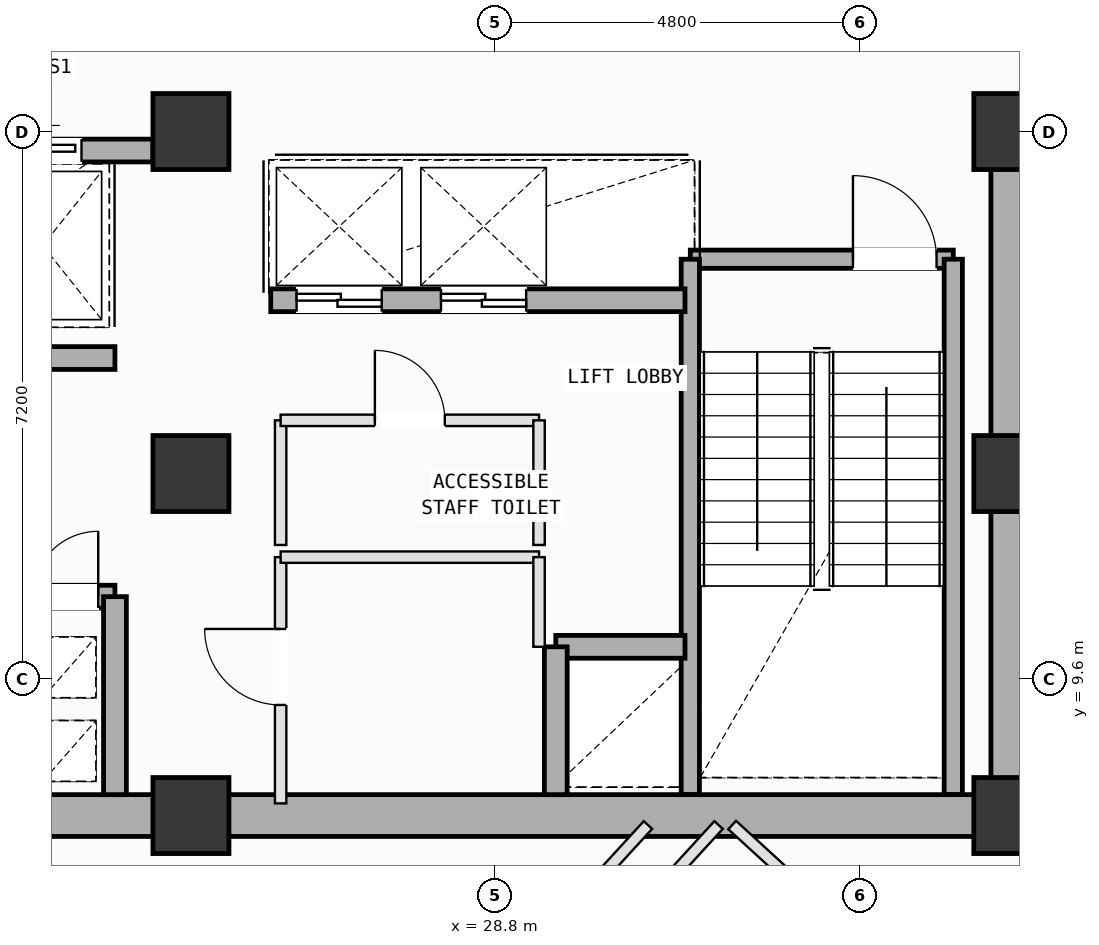
"""IFC4 building model, lengths in metres.
Left out: names, types, materials, properties, quantities, classifications, styles, units other than length and angle.
Written with IfcOpenShell. Run it as: python <this file> out.ifc"""

import sys

from ifc_helpers import new_model, si_unit, direction, frame, frame_2d, origin, origin_2d, place, context, subcontext, project, spatial, rectangle, extrude, element, fill, save


model = new_model("IFC4")
c1 = context("Model", 3, precision=1e-05, world=origin(), true_north=direction((0.0, 1.0)))
c2 = subcontext(c1, "Body", "Model", "MODEL_VIEW")
j1 = project(units=[si_unit("LENGTHUNIT", "METRE"), si_unit("PLANEANGLEUNIT", "RADIAN")], contexts=[c1])
p1 = place(None, origin())
s1 = spatial("IfcSite", under=j1, at=p1, CompositionType="ELEMENT")
p2 = place(p1, origin())
s2 = spatial("IfcBuilding", under=s1, at=p2, CompositionType="ELEMENT")
p3 = place(p2, frame((0.0, 0.0, 227.2)))
s3 = spatial("IfcBuildingStorey", under=s2, at=p3, CompositionType="ELEMENT", Elevation=227.2)
for number, where, z_axis, x_axis in (
    (1, (24.8, 7.8, 0.0), (0.0, 0.0, 1.0), (1.0, 0.0, 0.0)),
    (2, (24.8, 12.3, 0.0), (0.0, 0.0, 1.0), (1.0, 0.0, 0.0)),
    (3, (24.8, 16.8, 0.0), (0.0, 0.0, 1.0), (1.0, 0.0, 0.0)),
    (4, (35.6, 7.8, 0.0), (0.0, 0.0, 1.0), (1.0, 0.0, 0.0)),
    (5, (35.6, 12.3, 0.0), (0.0, 0.0, 1.0), (1.0, 0.0, 0.0)),
    (6, (35.6, 16.8, 0.0), (0.0, 0.0, 1.0), (1.0, 0.0, 0.0)),
):
    element("IfcColumn", number, at=place(p3, frame(where, z_axis=z_axis, x_axis=x_axis)), inside=s3, PredefinedType="COLUMN", context=c2, shape_type="SweptSolid", body=[
        extrude(rectangle(XDim=1.0, YDim=1.0, at=origin_2d()), origin(), (0.0, 0.0, 1.0), 4.0),
    ])
p4 = place(p3, frame((31.37, 15.12, 0.0), z_axis=(0.0, 0.0, 1.0), x_axis=(1.0, 0.0, 0.0)))
e7 = element("IfcWall", 7, at=p4, inside=s3, PredefinedType="SOLIDWALL", context=c2, shape_type="SweptSolid", body=[
    extrude(rectangle(XDim=3.46, YDim=0.24, at=frame_2d((1.73, 0.0))), origin(), (0.0, 0.0, 1.0), 3.78),
])
p5 = place(p4, frame((2.14, 0.0, 0.0)))
e8 = element("IfcOpeningElement", 8, at=p5, cuts=e7, PredefinedType="OPENING", context=c2, shape_type="SweptSolid", body=[
    extrude(rectangle(XDim=1.1, YDim=2.15, at=frame_2d((0.55, 1.075))), frame((0.0, 0.13, 0.0), z_axis=(0.0, -1.0, 0.0), x_axis=(1.0, 0.0, 0.0)), (0.0, 0.0, 1.0), 0.26),
])
for number, where, z_axis, x_axis in (
    (9, (34.83, 15.12, 0.0), (0.0, 0.0, 1.0), (0.0, -1.0, 0.0)),
    (10, (31.37, 8.075, 0.0), (0.0, 0.0, 1.0), (0.0, 1.0, 0.0)),
):
    element("IfcWall", number, at=place(p3, frame(where, z_axis=z_axis, x_axis=x_axis)), inside=s3, PredefinedType="SOLIDWALL", context=c2, shape_type="SweptSolid", body=[
        extrude(rectangle(XDim=7.045, YDim=0.24, at=frame_2d((3.522, 0.0))), origin(), (0.0, 0.0, 1.0), 3.78),
    ])
for number, where, z_axis, x_axis in (
    (11, (14.0, 7.8, 0.0), (0.0, 0.0, 1.0), (1.0, 0.0, 0.0)),
    (12, (24.8, 7.8, 0.0), (0.0, 0.0, 1.0), (1.0, 0.0, 0.0)),
):
    element("IfcWall", number, at=place(p3, frame(where, z_axis=z_axis, x_axis=x_axis)), inside=s3, PredefinedType="SHEAR", context=c2, shape_type="SweptSolid", body=[
        extrude(rectangle(XDim=10.8, YDim=0.55, at=frame_2d((5.4, 0.0))), origin(), (0.0, 0.0, 1.0), 3.78),
    ])
p6 = place(p3, frame((35.6, 7.8, 0.0), z_axis=(0.0, 0.0, 1.0), x_axis=(0.0, 1.0, 0.0)))
e13 = element("IfcWall", 13, at=p6, inside=s3, PredefinedType="SHEAR", context=c2, shape_type="SweptSolid", body=[
    extrude(rectangle(XDim=9.0, YDim=0.55, at=frame_2d((4.5, 0.0))), origin(), (0.0, 0.0, 1.0), 3.78),
])
p7 = place(p3, frame((19.85, 16.55, 0.0), z_axis=(0.0, 0.0, 1.0), x_axis=(1.0, 0.0, 0.0)))
e14 = element("IfcWall", 14, at=p7, inside=s3, PredefinedType="SOLIDWALL", context=c2, shape_type="SweptSolid", body=[
    extrude(rectangle(XDim=4.45, YDim=0.3, at=frame_2d((2.225, 0.0))), origin(), (0.0, 0.0, 1.0), 3.78),
])
p8 = place(p7, frame((0.475, 0.0, 0.0)))
e15 = element("IfcOpeningElement", 15, at=p8, cuts=e14, PredefinedType="OPENING", context=c2, shape_type="SweptSolid", body=[
    extrude(rectangle(XDim=1.25, YDim=2.18, at=frame_2d((0.625, 1.09))), frame((0.0, 0.16, 0.0), z_axis=(0.0, -1.0, 0.0), x_axis=(1.0, 0.0, 0.0)), (0.0, 0.0, 1.0), 0.32),
])
p9 = place(p7, frame((2.49, 0.0, 0.0)))
e16 = element("IfcOpeningElement", 16, at=p9, cuts=e14, PredefinedType="OPENING", context=c2, shape_type="SweptSolid", body=[
    extrude(rectangle(XDim=1.02, YDim=2.12, at=frame_2d((0.51, 1.06))), frame((0.0, 0.16, 0.0), z_axis=(0.0, -1.0, 0.0), x_axis=(1.0, 0.0, 0.0)), (0.0, 0.0, 1.0), 0.32),
])
p10 = place(p3, frame((18.5, 10.68, 0.0), z_axis=(0.0, 0.0, 1.0), x_axis=(1.0, 0.0, 0.0)))
e17 = element("IfcWall", 17, at=p10, inside=s3, PredefinedType="SOLIDWALL", context=c2, shape_type="SweptSolid", body=[
    extrude(rectangle(XDim=5.3, YDim=0.3, at=frame_2d((2.65, 0.0))), origin(), (0.0, 0.0, 1.0), 3.78),
])
p11 = place(p10, frame((4.22, 0.0, 0.0)))
e18 = element("IfcOpeningElement", 18, at=p11, cuts=e17, PredefinedType="OPENING", context=c2, shape_type="SweptSolid", body=[
    extrude(rectangle(XDim=0.86, YDim=2.06, at=frame_2d((0.43, 1.03))), frame((0.0, 0.16, 0.0), z_axis=(0.0, -1.0, 0.0), x_axis=(1.0, 0.0, 0.0)), (0.0, 0.0, 1.0), 0.32),
])
p12 = place(p10, frame((0.425, 0.0, 0.0)))
e19 = element("IfcOpeningElement", 19, at=p12, cuts=e17, PredefinedType="OPENING", context=c2, shape_type="SweptSolid", body=[
    extrude(rectangle(XDim=1.25, YDim=2.18, at=frame_2d((0.625, 1.09))), frame((0.0, 0.16, 0.0), z_axis=(0.0, -1.0, 0.0), x_axis=(1.0, 0.0, 0.0)), (0.0, 0.0, 1.0), 0.32),
])
p13 = place(p10, frame((2.525, 0.0, 0.0)))
e20 = element("IfcOpeningElement", 20, at=p13, cuts=e17, PredefinedType="OPENING", context=c2, shape_type="SweptSolid", body=[
    extrude(rectangle(XDim=1.25, YDim=2.18, at=frame_2d((0.625, 1.09))), frame((0.0, 0.16, 0.0), z_axis=(0.0, -1.0, 0.0), x_axis=(1.0, 0.0, 0.0)), (0.0, 0.0, 1.0), 0.32),
])
p14 = place(p3, frame((18.5, 13.82, 0.0), z_axis=(0.0, 0.0, 1.0), x_axis=(1.0, 0.0, 0.0)))
e21 = element("IfcWall", 21, at=p14, inside=s3, PredefinedType="SOLIDWALL", context=c2, shape_type="SweptSolid", body=[
    extrude(rectangle(XDim=5.3, YDim=0.3, at=frame_2d((2.65, 0.0))), origin(), (0.0, 0.0, 1.0), 3.78),
])
p15 = place(p14, frame((0.18, 0.0, 0.0)))
e22 = element("IfcOpeningElement", 22, at=p15, cuts=e21, PredefinedType="OPENING", context=c2, shape_type="SweptSolid", body=[
    extrude(rectangle(XDim=1.1, YDim=2.15, at=frame_2d((0.55, 1.075))), frame((0.0, 0.16, 0.0), z_axis=(0.0, -1.0, 0.0), x_axis=(1.0, 0.0, 0.0)), (0.0, 0.0, 1.0), 0.32),
])
p16 = place(p3, frame((23.8, 8.075, 0.0), z_axis=(0.0, 0.0, 1.0), x_axis=(0.0, 1.0, 0.0)))
e23 = element("IfcWall", 23, at=p16, inside=s3, PredefinedType="SOLIDWALL", context=c2, shape_type="SweptSolid", body=[
    extrude(rectangle(XDim=2.605, YDim=0.3, at=frame_2d((1.302, 0.0))), origin(), (0.0, 0.0, 1.0), 3.78),
])
p17 = place(p3, frame((29.6, 10.02, 0.0), z_axis=(0.0, 0.0, 1.0), x_axis=(1.0, 0.0, 0.0)))
e24 = element("IfcWall", 24, at=p17, inside=s3, PredefinedType="SOLIDWALL", context=c2, shape_type="SweptSolid", body=[
    extrude(rectangle(XDim=1.7, YDim=0.3, at=frame_2d((0.85, 0.0))), origin(), (0.0, 0.0, 1.0), 3.78),
])
p18 = place(p3, frame((29.6, 8.075, 0.0), z_axis=(0.0, 0.0, 1.0), x_axis=(0.0, 1.0, 0.0)))
e25 = element("IfcWall", 25, at=p18, inside=s3, PredefinedType="SOLIDWALL", context=c2, shape_type="SweptSolid", body=[
    extrude(rectangle(XDim=1.945, YDim=0.3, at=frame_2d((0.973, 0.0))), origin(), (0.0, 0.0, 1.0), 3.78),
])
p19 = place(p3, frame((25.85, 14.58, 0.0), z_axis=(0.0, 0.0, 1.0), x_axis=(1.0, 0.0, 0.0)))
e26 = element("IfcWall", 26, at=p19, inside=s3, PredefinedType="SOLIDWALL", context=c2, shape_type="SweptSolid", body=[
    extrude(rectangle(XDim=5.45, YDim=0.3, at=frame_2d((2.725, 0.0))), origin(), (0.0, 0.0, 1.0), 3.78),
])
p20 = place(p19, frame((0.34, 0.0, 0.0)))
e27 = element("IfcOpeningElement", 27, at=p20, cuts=e26, PredefinedType="OPENING", context=c2, shape_type="SweptSolid", body=[
    extrude(rectangle(XDim=1.12, YDim=2.15, at=frame_2d((0.56, 1.075))), frame((0.0, 0.16, 0.0), z_axis=(0.0, -1.0, 0.0), x_axis=(1.0, 0.0, 0.0)), (0.0, 0.0, 1.0), 0.32),
])
p21 = place(p19, frame((2.24, 0.0, 0.0)))
e28 = element("IfcOpeningElement", 28, at=p21, cuts=e26, PredefinedType="OPENING", context=c2, shape_type="SweptSolid", body=[
    extrude(rectangle(XDim=1.12, YDim=2.15, at=frame_2d((0.56, 1.075))), frame((0.0, 0.16, 0.0), z_axis=(0.0, -1.0, 0.0), x_axis=(1.0, 0.0, 0.0)), (0.0, 0.0, 1.0), 0.32),
])
p22 = place(p3, frame((25.98, 7.96, 0.0), z_axis=(0.0, 0.0, 1.0), x_axis=(0.0, 1.0, 0.0)))
e29 = element("IfcWall", 29, at=p22, inside=s3, PredefinedType="PARTITIONING", context=c2, shape_type="SweptSolid", body=[
    extrude(rectangle(XDim=3.24, YDim=0.15, at=frame_2d((1.62, 0.0))), origin(), (0.0, 0.0, 1.0), 3.78),
])
p23 = place(p22, frame((1.295, 0.0, 0.0)))
e30 = element("IfcOpeningElement", 30, at=p23, cuts=e29, PredefinedType="OPENING", context=c2, shape_type="SweptSolid", body=[
    extrude(rectangle(XDim=1.0, YDim=2.12, at=frame_2d((0.5, 1.06))), frame((0.0, 0.085, 0.0), z_axis=(0.0, -1.0, 0.0), x_axis=(1.0, 0.0, 0.0)), (0.0, 0.0, 1.0), 0.17),
])
p24 = place(p3, frame((25.98, 11.2, 0.0), z_axis=(0.0, 0.0, 1.0), x_axis=(1.0, 0.0, 0.0)))
e31 = element("IfcWall", 31, at=p24, inside=s3, PredefinedType="PARTITIONING", context=c2, shape_type="SweptSolid", body=[
    extrude(rectangle(XDim=3.4, YDim=0.15, at=frame_2d((1.7, 0.0))), origin(), (0.0, 0.0, 1.0), 3.78),
])
p25 = place(p3, frame((29.38, 11.2, 0.0), z_axis=(0.0, 0.0, 1.0), x_axis=(0.0, -1.0, 0.0)))
e32 = element("IfcWall", 32, at=p25, inside=s3, PredefinedType="PARTITIONING", context=c2, shape_type="SweptSolid", body=[
    extrude(rectangle(XDim=1.18, YDim=0.15, at=frame_2d((0.59, 0.0))), origin(), (0.0, 0.0, 1.0), 3.78),
])
p26 = place(p3, frame((25.98, 11.36, 0.0), z_axis=(0.0, 0.0, 1.0), x_axis=(0.0, 1.0, 0.0)))
e33 = element("IfcWall", 33, at=p26, inside=s3, PredefinedType="PARTITIONING", context=c2, shape_type="SweptSolid", body=[
    extrude(rectangle(XDim=1.64, YDim=0.15, at=frame_2d((0.82, 0.0))), origin(), (0.0, 0.0, 1.0), 3.78),
])
p27 = place(p3, frame((25.98, 13.0, 0.0), z_axis=(0.0, 0.0, 1.0), x_axis=(1.0, 0.0, 0.0)))
e34 = element("IfcWall", 34, at=p27, inside=s3, PredefinedType="PARTITIONING", context=c2, shape_type="SweptSolid", body=[
    extrude(rectangle(XDim=3.4, YDim=0.15, at=frame_2d((1.7, 0.0))), origin(), (0.0, 0.0, 1.0), 3.78),
])
p28 = place(p27, frame((1.24, 0.0, 0.0)))
e35 = element("IfcOpeningElement", 35, at=p28, cuts=e34, PredefinedType="OPENING", context=c2, shape_type="SweptSolid", body=[
    extrude(rectangle(XDim=0.92, YDim=2.1, at=frame_2d((0.46, 1.05))), frame((0.0, 0.085, 0.0), z_axis=(0.0, -1.0, 0.0), x_axis=(1.0, 0.0, 0.0)), (0.0, 0.0, 1.0), 0.17),
])
p29 = place(p3, frame((29.38, 13.0, 0.0), z_axis=(0.0, 0.0, 1.0), x_axis=(0.0, -1.0, 0.0)))
e36 = element("IfcWall", 36, at=p29, inside=s3, PredefinedType="PARTITIONING", context=c2, shape_type="SweptSolid", body=[
    extrude(rectangle(XDim=1.64, YDim=0.15, at=frame_2d((0.82, 0.0))), origin(), (0.0, 0.0, 1.0), 3.78),
])
p30 = place(p3, frame((28.149, 3.753, 0.0), z_axis=(0.0, 0.0, 1.0), x_axis=(0.675493888576, 0.737365585376, 0.0)))
e37 = element("IfcWall", 37, at=p30, inside=s3, PredefinedType="PARTITIONING", context=c2, shape_type="SweptSolid", body=[
    extrude(rectangle(XDim=5.319, YDim=0.15, at=frame_2d((2.66, 0.0))), origin(), (0.0, 0.0, 1.0), 3.78),
])
p31 = place(p3, frame((31.921, 7.675, 0.0), z_axis=(0.0, 0.0, 1.0), x_axis=(0.737312092313, -0.675552276681, 0.0)))
e38 = element("IfcWall", 38, at=p31, inside=s3, PredefinedType="PARTITIONING", context=c2, shape_type="SweptSolid", body=[
    extrude(rectangle(XDim=11.804, YDim=0.15, at=frame_2d((5.902, 0.0))), origin(), (0.0, 0.0, 1.0), 3.78),
])
p32 = place(p31, frame((5.706, 0.0, 0.0)))
e39 = element("IfcOpeningElement", 39, at=p32, cuts=e38, PredefinedType="OPENING", context=c2, shape_type="SweptSolid", body=[
    extrude(rectangle(XDim=0.86, YDim=2.06, at=frame_2d((0.43, 1.03))), frame((0.0, 0.085, 0.0), z_axis=(0.0, -1.0, 0.0), x_axis=(1.0, 0.0, 0.0)), (0.0, 0.0, 1.0), 0.17),
])
p33 = place(p3, frame((35.6, 7.5, 0.0), z_axis=(0.0, 0.0, 1.0), x_axis=(1.0, 0.0, 0.0)))
e40 = element("IfcWall", 40, at=p33, inside=s3, PredefinedType="PARTITIONING", context=c2, shape_type="SweptSolid", body=[
    extrude(rectangle(XDim=0.55, YDim=0.15, at=frame_2d((0.275, 0.0))), origin(), (0.0, 0.0, 1.0), 3.78),
])
p34 = place(p3, frame((30.813, 7.675, 0.0), z_axis=(0.0, 0.0, 1.0), x_axis=(-0.675559122353, -0.73730582, 0.0)))
e41 = element("IfcWall", 41, at=p34, inside=s3, PredefinedType="PARTITIONING", context=c2, shape_type="SweptSolid", body=[
    extrude(rectangle(XDim=12.826, YDim=0.15, at=frame_2d((6.413, 0.0))), origin(), (0.0, 0.0, 1.0), 3.78),
])
p35 = place(p5, origin())
e42 = element("IfcDoor", 42, at=p35, inside=s3, OperationType="SINGLE_SWING_LEFT", PredefinedType="DOOR", context=c2, shape_type="SweptSolid", body=[
    extrude(rectangle(XDim=1.1, YDim=2.15, at=frame_2d((0.55, 1.075))), frame((0.0, 0.025, 0.0), z_axis=(0.0, -1.0, 0.0), x_axis=(1.0, 0.0, 0.0)), (0.0, 0.0, 1.0), 0.05),
])
fill(e8, e42)
p36 = place(p11, origin())
e43 = element("IfcDoor", 43, at=p36, inside=s3, OperationType="SINGLE_SWING_RIGHT", PredefinedType="DOOR", context=c2, shape_type="SweptSolid", body=[
    extrude(rectangle(XDim=0.86, YDim=2.06, at=frame_2d((0.43, 1.03))), frame((0.0, 0.025, 0.0), z_axis=(0.0, -1.0, 0.0), x_axis=(1.0, 0.0, 0.0)), (0.0, 0.0, 1.0), 0.05),
])
fill(e18, e43)
p37 = place(p20, origin())
e44 = element("IfcDoor", 44, at=p37, inside=s3, OperationType="DOUBLE_DOOR_SLIDING", PredefinedType="DOOR", context=c2, shape_type="SweptSolid", body=[
    extrude(rectangle(XDim=1.12, YDim=2.15, at=frame_2d((0.56, 1.075))), frame((0.0, 0.025, 0.0), z_axis=(0.0, -1.0, 0.0), x_axis=(1.0, 0.0, 0.0)), (0.0, 0.0, 1.0), 0.05),
])
fill(e27, e44)
p38 = place(p21, origin())
e45 = element("IfcDoor", 45, at=p38, inside=s3, OperationType="DOUBLE_DOOR_SLIDING", PredefinedType="DOOR", context=c2, shape_type="SweptSolid", body=[
    extrude(rectangle(XDim=1.12, YDim=2.15, at=frame_2d((0.56, 1.075))), frame((0.0, 0.025, 0.0), z_axis=(0.0, -1.0, 0.0), x_axis=(1.0, 0.0, 0.0)), (0.0, 0.0, 1.0), 0.05),
])
fill(e28, e45)
p39 = place(p9, origin())
e46 = element("IfcDoor", 46, at=p39, inside=s3, OperationType="SLIDING_TO_LEFT", PredefinedType="DOOR", context=c2, shape_type="SweptSolid", body=[
    extrude(rectangle(XDim=1.02, YDim=2.12, at=frame_2d((0.51, 1.06))), frame((0.0, 0.025, 0.0), z_axis=(0.0, -1.0, 0.0), x_axis=(1.0, 0.0, 0.0)), (0.0, 0.0, 1.0), 0.05),
])
fill(e16, e46)
p40 = place(p23, origin())
e47 = element("IfcDoor", 47, at=p40, inside=s3, OperationType="SINGLE_SWING_RIGHT", PredefinedType="DOOR", context=c2, shape_type="SweptSolid", body=[
    extrude(rectangle(XDim=1.0, YDim=2.12, at=frame_2d((0.5, 1.06))), frame((0.0, 0.025, 0.0), z_axis=(0.0, -1.0, 0.0), x_axis=(1.0, 0.0, 0.0)), (0.0, 0.0, 1.0), 0.05),
])
fill(e30, e47)
p41 = place(p28, origin())
e48 = element("IfcDoor", 48, at=p41, inside=s3, OperationType="SINGLE_SWING_LEFT", PredefinedType="DOOR", context=c2, shape_type="SweptSolid", body=[
    extrude(rectangle(XDim=0.92, YDim=2.1, at=frame_2d((0.46, 1.05))), frame((0.0, 0.025, 0.0), z_axis=(0.0, -1.0, 0.0), x_axis=(1.0, 0.0, 0.0)), (0.0, 0.0, 1.0), 0.05),
])
fill(e35, e48)
save(model, sys.argv[1])
